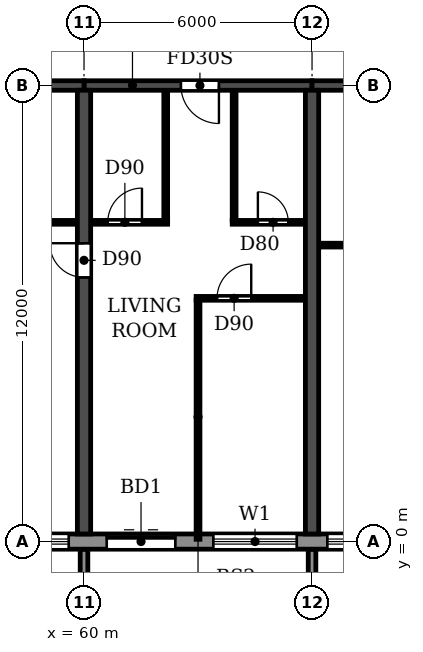
"""IFC4 building model, lengths in metres.
Left out: names, types, materials, properties, quantities, classifications, styles, units other than length and angle.
Written with IfcOpenShell. Run it as: python <this file> out.ifc"""

import sys

from ifc_helpers import new_model, si_unit, direction, frame, frame_2d, origin, place, context, subcontext, project, spatial, polyline, rectangle, outline, extrude, source, transform, mapped, element, fill, save


model = new_model("IFC4")
c1 = context("Model", 3, precision=1e-05, world=origin(), true_north=direction((0.0, 1.0)))
c2 = subcontext(c1, "Body", "Model", "MODEL_VIEW")
j1 = project(units=[si_unit("LENGTHUNIT", "METRE"), si_unit("PLANEANGLEUNIT", "RADIAN")], contexts=[c1])
p1 = place(None, origin())
s1 = spatial("IfcSite", under=j1, at=p1, CompositionType="ELEMENT")
p2 = place(p1, origin())
s2 = spatial("IfcBuilding", under=s1, at=p2, CompositionType="ELEMENT")
p3 = place(p2, frame((0.0, 0.0, 72.9)))
s3 = spatial("IfcBuildingStorey", under=s2, at=p3, CompositionType="ELEMENT", Elevation=72.9)
p4 = place(p3, frame((60.0, 0.2, 0.0), z_axis=(0.0, 0.0, 1.0), x_axis=(0.0, 1.0, 0.0)))
e1 = element("IfcWall", 1, at=p4, inside=s3, PredefinedType="SHEAR", context=c2, shape_type="SweptSolid", body=[
    extrude(rectangle(XDim=11.675, YDim=0.35, at=frame_2d((5.837, 0.0))), origin(), (0.0, 0.0, 1.0), 3.06),
])
p5 = place(p4, frame((6.75, 0.0, 0.0)))
e2 = element("IfcOpeningElement", 2, at=p5, cuts=e1, PredefinedType="OPENING", context=c2, shape_type="SweptSolid", body=[
    extrude(rectangle(XDim=0.9, YDim=2.1, at=frame_2d((0.45, 1.05))), frame((0.0, 0.185, 0.0), z_axis=(0.0, -1.0, 0.0), x_axis=(1.0, 0.0, 0.0)), (0.0, 0.0, 1.0), 0.37),
])
p6 = place(p3, frame((66.0, 0.2, 0.0), z_axis=(0.0, 0.0, 1.0), x_axis=(0.0, 1.0, 0.0)))
e3 = element("IfcWall", 3, at=p6, inside=s3, PredefinedType="SHEAR", context=c2, shape_type="SweptSolid", body=[
    extrude(rectangle(XDim=11.675, YDim=0.35, at=frame_2d((5.837, 0.0))), origin(), (0.0, 0.0, 1.0), 3.06),
])
p7 = place(p3, frame((54.0, 12.0, 0.0), z_axis=(0.0, 0.0, 1.0), x_axis=(1.0, 0.0, 0.0)))
e4 = element("IfcWall", 4, at=p7, inside=s3, PredefinedType="SHEAR", context=c2, shape_type="SweptSolid", body=[
    extrude(rectangle(XDim=6.0, YDim=0.25, at=frame_2d((3.0, 0.0))), origin(), (0.0, 0.0, 1.0), 2.46),
])
p8 = place(p3, frame((60.0, 12.0, 0.0), z_axis=(0.0, 0.0, 1.0), x_axis=(1.0, 0.0, 0.0)))
e5 = element("IfcWall", 5, at=p8, inside=s3, PredefinedType="SHEAR", context=c2, shape_type="SweptSolid", body=[
    extrude(rectangle(XDim=6.0, YDim=0.25, at=frame_2d((3.0, 0.0))), origin(), (0.0, 0.0, 1.0), 2.46),
])
p9 = place(p8, frame((2.55, 0.0, 0.0)))
e6 = element("IfcOpeningElement", 6, at=p9, cuts=e5, PredefinedType="OPENING", context=c2, shape_type="SweptSolid", body=[
    extrude(rectangle(XDim=1.0, YDim=2.1, at=frame_2d((0.5, 1.05))), frame((0.0, 0.135, 0.0), z_axis=(0.0, -1.0, 0.0), x_axis=(1.0, 0.0, 0.0)), (0.0, 0.0, 1.0), 0.27),
])
p10 = place(p3, frame((66.0, 12.0, 0.0), z_axis=(0.0, 0.0, 1.0), x_axis=(1.0, 0.0, 0.0)))
e7 = element("IfcWall", 7, at=p10, inside=s3, PredefinedType="SHEAR", context=c2, shape_type="SweptSolid", body=[
    extrude(rectangle(XDim=6.0, YDim=0.25, at=frame_2d((3.0, 0.0))), origin(), (0.0, 0.0, 1.0), 2.46),
])
p11 = place(p10, frame((2.55, 0.0, 0.0)))
e8 = element("IfcOpeningElement", 8, at=p11, cuts=e7, PredefinedType="OPENING", context=c2, shape_type="SweptSolid", body=[
    extrude(rectangle(XDim=1.0, YDim=2.1, at=frame_2d((0.5, 1.05))), frame((0.0, 0.135, 0.0), z_axis=(0.0, -1.0, 0.0), x_axis=(1.0, 0.0, 0.0)), (0.0, 0.0, 1.0), 0.27),
])
p12 = place(p3, frame((10.683, 0.0, 0.0), z_axis=(0.0, 0.0, 1.0), x_axis=(1.0, 0.0, 0.0)))
e9 = element("IfcWall", 9, at=p12, inside=s3, PredefinedType="STANDARD", context=c2, shape_type="SweptSolid", body=[
    extrude(rectangle(XDim=80.634, YDim=0.4, at=frame_2d((40.317, 0.0))), origin(), (0.0, 0.0, 1.0), 3.06),
])
p13 = place(p12, frame((1.717, 0.0, 0.9)))
e10 = element("IfcOpeningElement", 10, at=p13, cuts=e9, PredefinedType="OPENING", context=c2, shape_type="SweptSolid", body=[
    extrude(rectangle(XDim=2.2, YDim=1.5, at=frame_2d((1.1, 0.75))), frame((0.0, 0.21, 0.0), z_axis=(0.0, -1.0, 0.0), x_axis=(1.0, 0.0, 0.0)), (0.0, 0.0, 1.0), 0.42),
])
p14 = place(p12, frame((4.917, 0.0, 0.0)))
e11 = element("IfcOpeningElement", 11, at=p14, cuts=e9, PredefinedType="OPENING", context=c2, shape_type="SweptSolid", body=[
    extrude(rectangle(XDim=1.8, YDim=2.4, at=frame_2d((0.9, 1.2))), frame((0.0, 0.21, 0.0), z_axis=(0.0, -1.0, 0.0), x_axis=(1.0, 0.0, 0.0)), (0.0, 0.0, 1.0), 0.42),
])
p15 = place(p12, frame((7.717, 0.0, 0.9)))
e12 = element("IfcOpeningElement", 12, at=p15, cuts=e9, PredefinedType="OPENING", context=c2, shape_type="SweptSolid", body=[
    extrude(rectangle(XDim=2.2, YDim=1.5, at=frame_2d((1.1, 0.75))), frame((0.0, 0.21, 0.0), z_axis=(0.0, -1.0, 0.0), x_axis=(1.0, 0.0, 0.0)), (0.0, 0.0, 1.0), 0.42),
])
p16 = place(p12, frame((10.717, 0.0, 0.9)))
e13 = element("IfcOpeningElement", 13, at=p16, cuts=e9, PredefinedType="OPENING", context=c2, shape_type="SweptSolid", body=[
    extrude(rectangle(XDim=2.2, YDim=1.5, at=frame_2d((1.1, 0.75))), frame((0.0, 0.21, 0.0), z_axis=(0.0, -1.0, 0.0), x_axis=(1.0, 0.0, 0.0)), (0.0, 0.0, 1.0), 0.42),
])
p17 = place(p12, frame((13.717, 0.0, 0.9)))
e14 = element("IfcOpeningElement", 14, at=p17, cuts=e9, PredefinedType="OPENING", context=c2, shape_type="SweptSolid", body=[
    extrude(rectangle(XDim=2.2, YDim=1.5, at=frame_2d((1.1, 0.75))), frame((0.0, 0.21, 0.0), z_axis=(0.0, -1.0, 0.0), x_axis=(1.0, 0.0, 0.0)), (0.0, 0.0, 1.0), 0.42),
])
p18 = place(p12, frame((16.917, 0.0, 0.0)))
e15 = element("IfcOpeningElement", 15, at=p18, cuts=e9, PredefinedType="OPENING", context=c2, shape_type="SweptSolid", body=[
    extrude(rectangle(XDim=1.8, YDim=2.4, at=frame_2d((0.9, 1.2))), frame((0.0, 0.21, 0.0), z_axis=(0.0, -1.0, 0.0), x_axis=(1.0, 0.0, 0.0)), (0.0, 0.0, 1.0), 0.42),
])
p19 = place(p12, frame((19.717, 0.0, 0.9)))
e16 = element("IfcOpeningElement", 16, at=p19, cuts=e9, PredefinedType="OPENING", context=c2, shape_type="SweptSolid", body=[
    extrude(rectangle(XDim=2.2, YDim=1.5, at=frame_2d((1.1, 0.75))), frame((0.0, 0.21, 0.0), z_axis=(0.0, -1.0, 0.0), x_axis=(1.0, 0.0, 0.0)), (0.0, 0.0, 1.0), 0.42),
])
p20 = place(p12, frame((22.717, 0.0, 0.9)))
e17 = element("IfcOpeningElement", 17, at=p20, cuts=e9, PredefinedType="OPENING", context=c2, shape_type="SweptSolid", body=[
    extrude(rectangle(XDim=2.2, YDim=1.5, at=frame_2d((1.1, 0.75))), frame((0.0, 0.21, 0.0), z_axis=(0.0, -1.0, 0.0), x_axis=(1.0, 0.0, 0.0)), (0.0, 0.0, 1.0), 0.42),
])
p21 = place(p12, frame((25.917, 0.0, 0.0)))
e18 = element("IfcOpeningElement", 18, at=p21, cuts=e9, PredefinedType="OPENING", context=c2, shape_type="SweptSolid", body=[
    extrude(rectangle(XDim=1.8, YDim=2.4, at=frame_2d((0.9, 1.2))), frame((0.0, 0.21, 0.0), z_axis=(0.0, -1.0, 0.0), x_axis=(1.0, 0.0, 0.0)), (0.0, 0.0, 1.0), 0.42),
])
p22 = place(p12, frame((28.717, 0.0, 0.9)))
e19 = element("IfcOpeningElement", 19, at=p22, cuts=e9, PredefinedType="OPENING", context=c2, shape_type="SweptSolid", body=[
    extrude(rectangle(XDim=2.2, YDim=1.5, at=frame_2d((1.1, 0.75))), frame((0.0, 0.21, 0.0), z_axis=(0.0, -1.0, 0.0), x_axis=(1.0, 0.0, 0.0)), (0.0, 0.0, 1.0), 0.42),
])
p23 = place(p12, frame((31.717, 0.0, 0.9)))
e20 = element("IfcOpeningElement", 20, at=p23, cuts=e9, PredefinedType="OPENING", context=c2, shape_type="SweptSolid", body=[
    extrude(rectangle(XDim=2.2, YDim=1.5, at=frame_2d((1.1, 0.75))), frame((0.0, 0.21, 0.0), z_axis=(0.0, -1.0, 0.0), x_axis=(1.0, 0.0, 0.0)), (0.0, 0.0, 1.0), 0.42),
])
p24 = place(p12, frame((34.717, 0.0, 0.9)))
e21 = element("IfcOpeningElement", 21, at=p24, cuts=e9, PredefinedType="OPENING", context=c2, shape_type="SweptSolid", body=[
    extrude(rectangle(XDim=2.2, YDim=1.5, at=frame_2d((1.1, 0.75))), frame((0.0, 0.21, 0.0), z_axis=(0.0, -1.0, 0.0), x_axis=(1.0, 0.0, 0.0)), (0.0, 0.0, 1.0), 0.42),
])
p25 = place(p12, frame((37.917, 0.0, 0.0)))
e22 = element("IfcOpeningElement", 22, at=p25, cuts=e9, PredefinedType="OPENING", context=c2, shape_type="SweptSolid", body=[
    extrude(rectangle(XDim=1.8, YDim=2.4, at=frame_2d((0.9, 1.2))), frame((0.0, 0.21, 0.0), z_axis=(0.0, -1.0, 0.0), x_axis=(1.0, 0.0, 0.0)), (0.0, 0.0, 1.0), 0.42),
])
p26 = place(p12, frame((40.717, 0.0, 0.9)))
e23 = element("IfcOpeningElement", 23, at=p26, cuts=e9, PredefinedType="OPENING", context=c2, shape_type="SweptSolid", body=[
    extrude(rectangle(XDim=2.2, YDim=1.5, at=frame_2d((1.1, 0.75))), frame((0.0, 0.21, 0.0), z_axis=(0.0, -1.0, 0.0), x_axis=(1.0, 0.0, 0.0)), (0.0, 0.0, 1.0), 0.42),
])
p27 = place(p12, frame((43.717, 0.0, 0.9)))
e24 = element("IfcOpeningElement", 24, at=p27, cuts=e9, PredefinedType="OPENING", context=c2, shape_type="SweptSolid", body=[
    extrude(rectangle(XDim=2.2, YDim=1.5, at=frame_2d((1.1, 0.75))), frame((0.0, 0.21, 0.0), z_axis=(0.0, -1.0, 0.0), x_axis=(1.0, 0.0, 0.0)), (0.0, 0.0, 1.0), 0.42),
])
p28 = place(p12, frame((46.717, 0.0, 0.9)))
e25 = element("IfcOpeningElement", 25, at=p28, cuts=e9, PredefinedType="OPENING", context=c2, shape_type="SweptSolid", body=[
    extrude(rectangle(XDim=2.2, YDim=1.5, at=frame_2d((1.1, 0.75))), frame((0.0, 0.21, 0.0), z_axis=(0.0, -1.0, 0.0), x_axis=(1.0, 0.0, 0.0)), (0.0, 0.0, 1.0), 0.42),
])
p29 = place(p12, frame((49.917, 0.0, 0.0)))
e26 = element("IfcOpeningElement", 26, at=p29, cuts=e9, PredefinedType="OPENING", context=c2, shape_type="SweptSolid", body=[
    extrude(rectangle(XDim=1.8, YDim=2.4, at=frame_2d((0.9, 1.2))), frame((0.0, 0.21, 0.0), z_axis=(0.0, -1.0, 0.0), x_axis=(1.0, 0.0, 0.0)), (0.0, 0.0, 1.0), 0.42),
])
p30 = place(p12, frame((52.717, 0.0, 0.9)))
e27 = element("IfcOpeningElement", 27, at=p30, cuts=e9, PredefinedType="OPENING", context=c2, shape_type="SweptSolid", body=[
    extrude(rectangle(XDim=2.2, YDim=1.5, at=frame_2d((1.1, 0.75))), frame((0.0, 0.21, 0.0), z_axis=(0.0, -1.0, 0.0), x_axis=(1.0, 0.0, 0.0)), (0.0, 0.0, 1.0), 0.42),
])
p31 = place(p12, frame((55.717, 0.0, 0.9)))
e28 = element("IfcOpeningElement", 28, at=p31, cuts=e9, PredefinedType="OPENING", context=c2, shape_type="SweptSolid", body=[
    extrude(rectangle(XDim=2.2, YDim=1.5, at=frame_2d((1.1, 0.75))), frame((0.0, 0.21, 0.0), z_axis=(0.0, -1.0, 0.0), x_axis=(1.0, 0.0, 0.0)), (0.0, 0.0, 1.0), 0.42),
])
p32 = place(p12, frame((58.717, 0.0, 0.9)))
e29 = element("IfcOpeningElement", 29, at=p32, cuts=e9, PredefinedType="OPENING", context=c2, shape_type="SweptSolid", body=[
    extrude(rectangle(XDim=2.2, YDim=1.5, at=frame_2d((1.1, 0.75))), frame((0.0, 0.21, 0.0), z_axis=(0.0, -1.0, 0.0), x_axis=(1.0, 0.0, 0.0)), (0.0, 0.0, 1.0), 0.42),
])
p33 = place(p12, frame((61.717, 0.0, 0.9)))
e30 = element("IfcOpeningElement", 30, at=p33, cuts=e9, PredefinedType="OPENING", context=c2, shape_type="SweptSolid", body=[
    extrude(rectangle(XDim=2.2, YDim=1.5, at=frame_2d((1.1, 0.75))), frame((0.0, 0.21, 0.0), z_axis=(0.0, -1.0, 0.0), x_axis=(1.0, 0.0, 0.0)), (0.0, 0.0, 1.0), 0.42),
])
p34 = place(p12, frame((64.917, 0.0, 0.0)))
e31 = element("IfcOpeningElement", 31, at=p34, cuts=e9, PredefinedType="OPENING", context=c2, shape_type="SweptSolid", body=[
    extrude(rectangle(XDim=1.8, YDim=2.4, at=frame_2d((0.9, 1.2))), frame((0.0, 0.21, 0.0), z_axis=(0.0, -1.0, 0.0), x_axis=(1.0, 0.0, 0.0)), (0.0, 0.0, 1.0), 0.42),
])
p35 = place(p12, frame((67.717, 0.0, 0.9)))
e32 = element("IfcOpeningElement", 32, at=p35, cuts=e9, PredefinedType="OPENING", context=c2, shape_type="SweptSolid", body=[
    extrude(rectangle(XDim=2.2, YDim=1.5, at=frame_2d((1.1, 0.75))), frame((0.0, 0.21, 0.0), z_axis=(0.0, -1.0, 0.0), x_axis=(1.0, 0.0, 0.0)), (0.0, 0.0, 1.0), 0.42),
])
p36 = place(p12, frame((70.717, 0.0, 0.9)))
e33 = element("IfcOpeningElement", 33, at=p36, cuts=e9, PredefinedType="OPENING", context=c2, shape_type="SweptSolid", body=[
    extrude(rectangle(XDim=2.2, YDim=1.5, at=frame_2d((1.1, 0.75))), frame((0.0, 0.21, 0.0), z_axis=(0.0, -1.0, 0.0), x_axis=(1.0, 0.0, 0.0)), (0.0, 0.0, 1.0), 0.42),
])
p37 = place(p12, frame((73.917, 0.0, 0.0)))
e34 = element("IfcOpeningElement", 34, at=p37, cuts=e9, PredefinedType="OPENING", context=c2, shape_type="SweptSolid", body=[
    extrude(rectangle(XDim=1.8, YDim=2.4, at=frame_2d((0.9, 1.2))), frame((0.0, 0.21, 0.0), z_axis=(0.0, -1.0, 0.0), x_axis=(1.0, 0.0, 0.0)), (0.0, 0.0, 1.0), 0.42),
])
p38 = place(p12, frame((76.717, 0.0, 0.9)))
e35 = element("IfcOpeningElement", 35, at=p38, cuts=e9, PredefinedType="OPENING", context=c2, shape_type="SweptSolid", body=[
    extrude(rectangle(XDim=2.2, YDim=1.5, at=frame_2d((1.1, 0.75))), frame((0.0, 0.21, 0.0), z_axis=(0.0, -1.0, 0.0), x_axis=(1.0, 0.0, 0.0)), (0.0, 0.0, 1.0), 0.42),
])
m1 = source(origin(), c2, "Body", "SweptSolid", [
    extrude(outline(polyline([(0.0, 0.0), (0.2, 0.0), (0.2, 1.65), (0.0, 1.65), (0.0, 0.0)])), origin(), (0.0, 0.0, 1.0), 3.1),
])
for number, where in (
    (36, (59.9, -1.85, 0.0)),
    (37, (65.9, -1.85, 0.0)),
):
    element("IfcWall", number, at=place(p3, frame(where)), inside=s3, PredefinedType="STANDARD", context=c2, shape_type="MappedRepresentation", body=[
        mapped(m1, transform((0.0, 0.0, 0.0))),
    ])
p39 = place(p3, frame((62.95, 6.4, 0.0), z_axis=(0.0, 0.0, 1.0), x_axis=(1.0, 0.0, 0.0)))
e38 = element("IfcWall", 38, at=p39, inside=s3, PredefinedType="PARTITIONING", context=c2, shape_type="SweptSolid", body=[
    extrude(rectangle(XDim=2.865, YDim=0.1, at=frame_2d((1.433, 0.0))), origin(), (0.0, 0.0, 1.0), 3.06),
])
p40 = place(p39, frame((0.55, 0.0, 0.0)))
e39 = element("IfcOpeningElement", 39, at=p40, cuts=e38, PredefinedType="OPENING", context=c2, shape_type="SweptSolid", body=[
    extrude(rectangle(XDim=0.9, YDim=2.1, at=frame_2d((0.45, 1.05))), frame((0.0, 0.06, 0.0), z_axis=(0.0, -1.0, 0.0), x_axis=(1.0, 0.0, 0.0)), (0.0, 0.0, 1.0), 0.12),
])
p41 = place(p3, frame((66.185, 7.8, 0.0), z_axis=(0.0, 0.0, 1.0), x_axis=(1.0, 0.0, 0.0)))
e40 = element("IfcWall", 40, at=p41, inside=s3, PredefinedType="PARTITIONING", context=c2, shape_type="SweptSolid", body=[
    extrude(rectangle(XDim=2.015, YDim=0.1, at=frame_2d((1.007, 0.0))), origin(), (0.0, 0.0, 1.0), 3.06),
])
p42 = place(p3, frame((57.1, 8.4, 0.0), z_axis=(0.0, 0.0, 1.0), x_axis=(1.0, 0.0, 0.0)))
e41 = element("IfcWall", 41, at=p42, inside=s3, PredefinedType="PARTITIONING", context=c2, shape_type="SweptSolid", body=[
    extrude(rectangle(XDim=2.715, YDim=0.1, at=frame_2d((1.357, 0.0))), origin(), (0.0, 0.0, 1.0), 3.06),
])
p43 = place(p42, frame((1.0, 0.0, 0.0)))
e42 = element("IfcOpeningElement", 42, at=p43, cuts=e41, PredefinedType="OPENING", context=c2, shape_type="SweptSolid", body=[
    extrude(rectangle(XDim=0.8, YDim=2.1, at=frame_2d((0.4, 1.05))), frame((0.0, 0.06, 0.0), z_axis=(0.0, -1.0, 0.0), x_axis=(1.0, 0.0, 0.0)), (0.0, 0.0, 1.0), 0.12),
])
p44 = place(p3, frame((60.185, 8.4, 0.0), z_axis=(0.0, 0.0, 1.0), x_axis=(1.0, 0.0, 0.0)))
e43 = element("IfcWall", 43, at=p44, inside=s3, PredefinedType="PARTITIONING", context=c2, shape_type="SweptSolid", body=[
    extrude(rectangle(XDim=2.015, YDim=0.1, at=frame_2d((1.007, 0.0))), origin(), (0.0, 0.0, 1.0), 3.06),
])
p45 = place(p44, frame((0.44, 0.0, 0.0)))
e44 = element("IfcOpeningElement", 44, at=p45, cuts=e43, PredefinedType="OPENING", context=c2, shape_type="SweptSolid", body=[
    extrude(rectangle(XDim=0.9, YDim=2.1, at=frame_2d((0.45, 1.05))), frame((0.0, 0.06, 0.0), z_axis=(0.0, -1.0, 0.0), x_axis=(1.0, 0.0, 0.0)), (0.0, 0.0, 1.0), 0.12),
])
p46 = place(p3, frame((63.9, 8.4, 0.0), z_axis=(0.0, 0.0, 1.0), x_axis=(1.0, 0.0, 0.0)))
e45 = element("IfcWall", 45, at=p46, inside=s3, PredefinedType="PARTITIONING", context=c2, shape_type="SweptSolid", body=[
    extrude(rectangle(XDim=1.915, YDim=0.1, at=frame_2d((0.958, 0.0))), origin(), (0.0, 0.0, 1.0), 3.06),
])
p47 = place(p46, frame((0.675, 0.0, 0.0)))
e46 = element("IfcOpeningElement", 46, at=p47, cuts=e45, PredefinedType="OPENING", context=c2, shape_type="SweptSolid", body=[
    extrude(rectangle(XDim=0.8, YDim=2.1, at=frame_2d((0.4, 1.05))), frame((0.0, 0.06, 0.0), z_axis=(0.0, -1.0, 0.0), x_axis=(1.0, 0.0, 0.0)), (0.0, 0.0, 1.0), 0.12),
])
p48 = place(p3, frame((62.15, 8.45, 0.0), z_axis=(0.0, 0.0, 1.0), x_axis=(0.0, 1.0, 0.0)))
e47 = element("IfcWall", 47, at=p48, inside=s3, PredefinedType="PARTITIONING", context=c2, shape_type="SweptSolid", body=[
    extrude(rectangle(XDim=3.415, YDim=0.1, at=frame_2d((1.708, 0.0))), origin(), (0.0, 0.0, 1.0), 3.06),
])
p49 = place(p3, frame((63.0, 0.06, 0.0), z_axis=(0.0, 0.0, 1.0), x_axis=(0.0, 1.0, 0.0)))
e48 = element("IfcWall", 48, at=p49, inside=s3, PredefinedType="PARTITIONING", context=c2, shape_type="SweptSolid", body=[
    extrude(rectangle(XDim=6.29, YDim=0.1, at=frame_2d((3.145, 0.0))), origin(), (0.0, 0.0, 1.0), 3.06),
])
p50 = place(p3, frame((63.95, 8.45, 0.0), z_axis=(0.0, 0.0, 1.0), x_axis=(0.0, 1.0, 0.0)))
e49 = element("IfcWall", 49, at=p50, inside=s3, PredefinedType="PARTITIONING", context=c2, shape_type="SweptSolid", body=[
    extrude(rectangle(XDim=3.415, YDim=0.1, at=frame_2d((1.708, 0.0))), origin(), (0.0, 0.0, 1.0), 3.06),
])
p51 = place(p28, origin())
e50 = element("IfcWindow", 50, at=p51, inside=s3, PartitioningType="DOUBLE_PANEL_HORIZONTAL", PredefinedType="WINDOW", context=c2, shape_type="SweptSolid", body=[
    extrude(rectangle(XDim=2.2, YDim=1.5, at=frame_2d((1.1, 0.75))), frame((0.0, 0.03, 0.0), z_axis=(0.0, -1.0, 0.0), x_axis=(1.0, 0.0, 0.0)), (0.0, 0.0, 1.0), 0.06),
])
fill(e25, e50)
p52 = place(p29, origin())
e51 = element("IfcDoor", 51, at=p52, inside=s3, OperationType="DOUBLE_DOOR_SLIDING", PredefinedType="DOOR", context=c2, shape_type="SweptSolid", body=[
    extrude(rectangle(XDim=1.8, YDim=2.4, at=frame_2d((0.9, 1.2))), frame((0.0, 0.025, 0.0), z_axis=(0.0, -1.0, 0.0), x_axis=(1.0, 0.0, 0.0)), (0.0, 0.0, 1.0), 0.05),
])
fill(e26, e51)
p53 = place(p30, origin())
e52 = element("IfcWindow", 52, at=p53, inside=s3, PartitioningType="DOUBLE_PANEL_HORIZONTAL", PredefinedType="WINDOW", context=c2, shape_type="SweptSolid", body=[
    extrude(rectangle(XDim=2.2, YDim=1.5, at=frame_2d((1.1, 0.75))), frame((0.0, 0.03, 0.0), z_axis=(0.0, -1.0, 0.0), x_axis=(1.0, 0.0, 0.0)), (0.0, 0.0, 1.0), 0.06),
])
fill(e27, e52)
p54 = place(p31, origin())
e53 = element("IfcWindow", 53, at=p54, inside=s3, PartitioningType="DOUBLE_PANEL_HORIZONTAL", PredefinedType="WINDOW", context=c2, shape_type="SweptSolid", body=[
    extrude(rectangle(XDim=2.2, YDim=1.5, at=frame_2d((1.1, 0.75))), frame((0.0, 0.03, 0.0), z_axis=(0.0, -1.0, 0.0), x_axis=(1.0, 0.0, 0.0)), (0.0, 0.0, 1.0), 0.06),
])
fill(e28, e53)
p55 = place(p5, origin())
e54 = element("IfcDoor", 54, at=p55, inside=s3, OperationType="SINGLE_SWING_RIGHT", PredefinedType="DOOR", context=c2, shape_type="SweptSolid", body=[
    extrude(rectangle(XDim=0.9, YDim=2.1, at=frame_2d((0.45, 1.05))), frame((0.0, 0.025, 0.0), z_axis=(0.0, -1.0, 0.0), x_axis=(1.0, 0.0, 0.0)), (0.0, 0.0, 1.0), 0.05),
])
fill(e2, e54)
p56 = place(p45, origin())
e55 = element("IfcDoor", 55, at=p56, inside=s3, OperationType="SINGLE_SWING_RIGHT", PredefinedType="DOOR", context=c2, shape_type="SweptSolid", body=[
    extrude(rectangle(XDim=0.9, YDim=2.1, at=frame_2d((0.45, 1.05))), frame((0.0, 0.025, 0.0), z_axis=(0.0, -1.0, 0.0), x_axis=(1.0, 0.0, 0.0)), (0.0, 0.0, 1.0), 0.05),
])
fill(e44, e55)
p57 = place(p9, frame((1.0, 0.0, 0.0), z_axis=(0.0, 0.0, 1.0), x_axis=(-1.0, 0.0, 0.0)))
e56 = element("IfcDoor", 56, at=p57, inside=s3, OperationType="SINGLE_SWING_LEFT", PredefinedType="DOOR", context=c2, shape_type="SweptSolid", body=[
    extrude(rectangle(XDim=1.0, YDim=2.1, at=frame_2d((0.5, 1.05))), frame((0.0, 0.025, 0.0), z_axis=(0.0, -1.0, 0.0), x_axis=(1.0, 0.0, 0.0)), (0.0, 0.0, 1.0), 0.05),
])
fill(e6, e56)
p58 = place(p40, origin())
e57 = element("IfcDoor", 57, at=p58, inside=s3, OperationType="SINGLE_SWING_RIGHT", PredefinedType="DOOR", context=c2, shape_type="SweptSolid", body=[
    extrude(rectangle(XDim=0.9, YDim=2.1, at=frame_2d((0.45, 1.05))), frame((0.0, 0.025, 0.0), z_axis=(0.0, -1.0, 0.0), x_axis=(1.0, 0.0, 0.0)), (0.0, 0.0, 1.0), 0.05),
])
fill(e39, e57)
p59 = place(p47, origin())
e58 = element("IfcDoor", 58, at=p59, inside=s3, OperationType="SINGLE_SWING_LEFT", PredefinedType="DOOR", context=c2, shape_type="SweptSolid", body=[
    extrude(rectangle(XDim=0.8, YDim=2.1, at=frame_2d((0.4, 1.05))), frame((0.0, 0.025, 0.0), z_axis=(0.0, -1.0, 0.0), x_axis=(1.0, 0.0, 0.0)), (0.0, 0.0, 1.0), 0.05),
])
fill(e46, e58)
save(model, sys.argv[1])
